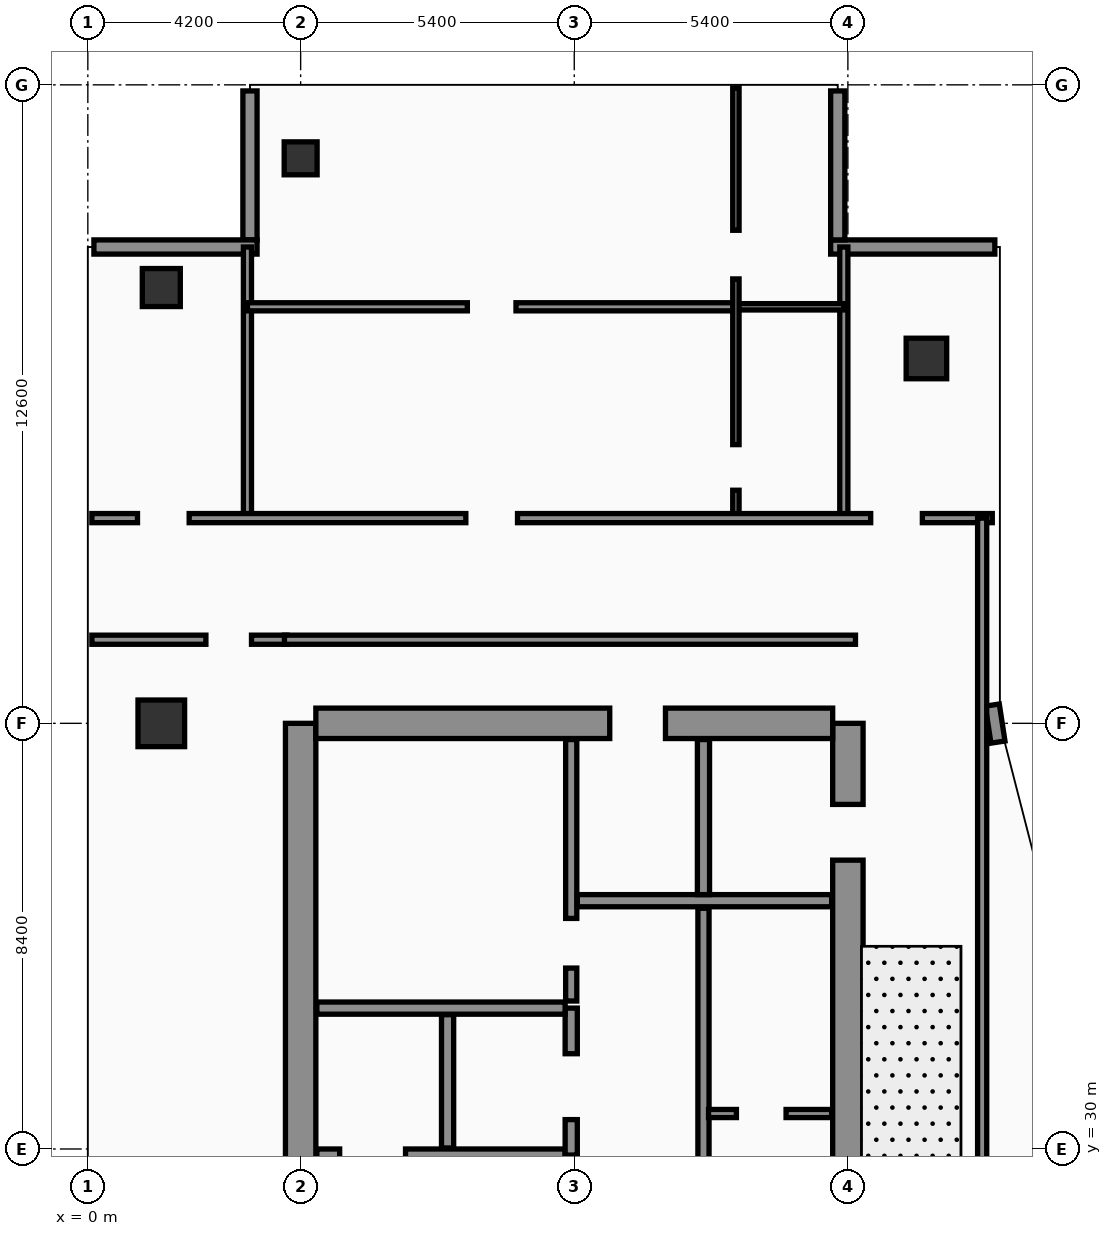
"""IFC4 building model, lengths in metres.
Left out: names, types, materials, properties, quantities, classifications, styles, units other than length and angle.
Written with IfcOpenShell. Run it as: python <this file> out.ifc"""

import sys

from ifc_helpers import new_model, si_unit, direction, frame, frame_2d, origin, origin_2d, place, context, subcontext, project, spatial, rectangle, hollow_rectangle, extrude, element, fill, save


model = new_model("IFC4")
c1 = context("Model", 3, precision=1e-05, world=origin(), true_north=direction((0.0, 1.0)))
c2 = subcontext(c1, "Body", "Model", "MODEL_VIEW")
j1 = project(units=[si_unit("LENGTHUNIT", "METRE"), si_unit("PLANEANGLEUNIT", "RADIAN")], contexts=[c1])
p1 = place(None, origin())
s1 = spatial("IfcSite", under=j1, at=p1, CompositionType="ELEMENT")
p2 = place(p1, origin())
s2 = spatial("IfcBuilding", under=s1, at=p2, CompositionType="ELEMENT")
p3 = place(p2, frame((0.0, 0.0, 291.1)))
s3 = spatial("IfcBuildingStorey", under=s2, at=p3, CompositionType="ELEMENT", Elevation=291.1)
p4 = place(p3, frame((4.2, 16.8, 0.0), z_axis=(0.0, 0.0, 1.0), x_axis=(0.0, 1.0, 0.0)))
e1 = element("IfcWall", 1, at=p4, inside=s3, PredefinedType="SHEAR", context=c2, shape_type="SweptSolid", body=[
    extrude(rectangle(XDim=21.6, YDim=0.6, at=frame_2d((10.8, 0.0))), origin(), (0.0, 0.0, 1.0), 3.56),
])
p5 = place(p3, frame((15.0, 16.8, 0.0), z_axis=(0.0, 0.0, 1.0), x_axis=(0.0, 1.0, 0.0)))
e2 = element("IfcWall", 2, at=p5, inside=s3, PredefinedType="SHEAR", context=c2, shape_type="SweptSolid", body=[
    extrude(rectangle(XDim=21.6, YDim=0.6, at=frame_2d((10.8, 0.0))), origin(), (0.0, 0.0, 1.0), 3.56),
])
p6 = place(p5, frame((8.65, 0.0, 0.0)))
e3 = element("IfcOpeningElement", 3, at=p6, cuts=e2, PredefinedType="OPENING", context=c2, shape_type="SweptSolid", body=[
    extrude(rectangle(XDim=1.1, YDim=2.2, at=frame_2d((0.55, 1.1))), frame((0.0, 0.31, 0.0), z_axis=(0.0, -1.0, 0.0), x_axis=(1.0, 0.0, 0.0)), (0.0, 0.0, 1.0), 0.62),
])
p7 = place(p5, frame((18.9, 0.0, 0.0)))
e4 = element("IfcOpeningElement", 4, at=p7, cuts=e2, PredefinedType="OPENING", context=c2, shape_type="SweptSolid", body=[
    extrude(rectangle(XDim=1.1, YDim=2.2, at=frame_2d((0.55, 1.1))), frame((0.0, 0.31, 0.0), z_axis=(0.0, -1.0, 0.0), x_axis=(1.0, 0.0, 0.0)), (0.0, 0.0, 1.0), 0.62),
])
p8 = place(p3, frame((4.5, 38.4, 0.0), z_axis=(0.0, 0.0, 1.0), x_axis=(1.0, 0.0, 0.0)))
e5 = element("IfcWall", 5, at=p8, inside=s3, PredefinedType="SHEAR", context=c2, shape_type="SweptSolid", body=[
    extrude(rectangle(XDim=10.2, YDim=0.6, at=frame_2d((5.1, 0.0))), origin(), (0.0, 0.0, 1.0), 3.56),
])
p9 = place(p8, frame((5.8, 0.0, 0.0)))
e6 = element("IfcOpeningElement", 6, at=p9, cuts=e5, PredefinedType="OPENING", context=c2, shape_type="SweptSolid", body=[
    extrude(rectangle(XDim=1.1, YDim=2.2, at=frame_2d((0.55, 1.1))), frame((0.0, 0.31, 0.0), z_axis=(0.0, -1.0, 0.0), x_axis=(1.0, 0.0, 0.0)), (0.0, 0.0, 1.0), 0.62),
])
p10 = place(p3, frame((1.45, 38.4, 0.0), z_axis=(0.0, 0.0, 1.0), x_axis=(1.0, 0.0, 0.0)))
e7 = element("IfcColumn", 7, at=p10, inside=s3, PredefinedType="COLUMN", context=c2, shape_type="SweptSolid", body=[
    extrude(rectangle(XDim=0.92, YDim=0.92, at=origin_2d()), origin(), (0.0, 0.0, 1.0), 3.56),
])
p11 = place(p3, frame((1.45, 47.0, 0.0), z_axis=(0.0, 0.0, 1.0), x_axis=(1.0, 0.0, 0.0)))
e8 = element("IfcColumn", 8, at=p11, inside=s3, PredefinedType="COLUMN", context=c2, shape_type="SweptSolid", body=[
    extrude(hollow_rectangle(XDim=0.75, YDim=0.75, WallThickness=0.032, at=origin_2d()), origin(), (0.0, 0.0, 1.0), 3.56),
])
p12 = place(p3, frame((4.2, 49.55, 0.0), z_axis=(0.0, 0.0, 1.0), x_axis=(1.0, 0.0, 0.0)))
e9 = element("IfcColumn", 9, at=p12, inside=s3, PredefinedType="COLUMN", context=c2, shape_type="SweptSolid", body=[
    extrude(hollow_rectangle(XDim=0.65, YDim=0.65, WallThickness=0.028, at=origin_2d()), origin(), (0.0, 0.0, 1.0), 3.56),
])
p13 = place(p3, frame((16.55, 45.6, 0.0), z_axis=(0.0, 0.0, 1.0), x_axis=(1.0, 0.0, 0.0)))
e10 = element("IfcColumn", 10, at=p13, inside=s3, PredefinedType="COLUMN", context=c2, shape_type="SweptSolid", body=[
    extrude(rectangle(XDim=0.8, YDim=0.8, at=origin_2d()), origin(), (0.0, 0.0, 1.0), 3.56),
])
p14 = place(p3, frame((17.962, 38.03, 0.0), z_axis=(0.0, 0.0, 1.0), x_axis=(-0.15141125477, 0.988470855377, 0.0)))
e11 = element("IfcWall", 11, at=p14, inside=s3, PredefinedType="SOLIDWALL", context=c2, shape_type="SweptSolid", body=[
    extrude(rectangle(XDim=0.739, YDim=0.28, at=frame_2d((0.369, 0.0))), origin(), (0.0, 0.0, 1.0), 3.56),
])
p15 = place(p3, frame((17.9, 47.8, 0.0), z_axis=(0.0, 0.0, 1.0), x_axis=(-1.0, 0.0, 0.0)))
e12 = element("IfcWall", 12, at=p15, inside=s3, PredefinedType="SOLIDWALL", context=c2, shape_type="SweptSolid", body=[
    extrude(rectangle(XDim=3.24, YDim=0.28, at=frame_2d((1.62, 0.0))), origin(), (0.0, 0.0, 1.0), 3.56),
])
p16 = place(p3, frame((14.8, 47.94, 0.0), z_axis=(0.0, 0.0, 1.0), x_axis=(0.0, 1.0, 0.0)))
e13 = element("IfcWall", 13, at=p16, inside=s3, PredefinedType="SOLIDWALL", context=c2, shape_type="SweptSolid", body=[
    extrude(rectangle(XDim=2.94, YDim=0.28, at=frame_2d((1.47, 0.0))), origin(), (0.0, 0.0, 1.0), 3.56),
])
p17 = place(p3, frame((3.2, 50.88, 0.0), z_axis=(0.0, 0.0, 1.0), x_axis=(0.0, -1.0, 0.0)))
e14 = element("IfcWall", 14, at=p17, inside=s3, PredefinedType="SOLIDWALL", context=c2, shape_type="SweptSolid", body=[
    extrude(rectangle(XDim=2.94, YDim=0.28, at=frame_2d((1.47, 0.0))), origin(), (0.0, 0.0, 1.0), 3.09),
])
p18 = place(p3, frame((3.34, 47.8, 0.0), z_axis=(0.0, 0.0, 1.0), x_axis=(-1.0, 0.0, 0.0)))
e15 = element("IfcWall", 15, at=p18, inside=s3, PredefinedType="SOLIDWALL", context=c2, shape_type="SweptSolid", body=[
    extrude(rectangle(XDim=3.22, YDim=0.28, at=frame_2d((1.61, 0.0))), origin(), (0.0, 0.0, 1.0), 3.09),
])
p19 = place(p3, frame((4.52, 29.88, 0.0), z_axis=(0.0, 0.0, 1.0), x_axis=(1.0, 0.0, 0.0)))
e16 = element("IfcWall", 16, at=p19, inside=s3, PredefinedType="SOLIDWALL", context=c2, shape_type="SweptSolid", body=[
    extrude(rectangle(XDim=4.9, YDim=0.24, at=frame_2d((2.45, 0.0))), origin(), (0.0, 0.0, 1.0), 3.56),
])
p20 = place(p19, frame((0.45, 0.0, 0.0)))
e17 = element("IfcOpeningElement", 17, at=p20, cuts=e16, PredefinedType="OPENING", context=c2, shape_type="SweptSolid", body=[
    extrude(rectangle(XDim=1.3, YDim=2.35, at=frame_2d((0.65, 1.175))), frame((0.0, 0.13, 0.0), z_axis=(0.0, -1.0, 0.0), x_axis=(1.0, 0.0, 0.0)), (0.0, 0.0, 1.0), 0.26),
])
p21 = place(p3, frame((7.1, 30.02, 0.0), z_axis=(0.0, 0.0, 1.0), x_axis=(0.0, 1.0, 0.0)))
e18 = element("IfcWall", 18, at=p21, inside=s3, PredefinedType="SOLIDWALL", context=c2, shape_type="SweptSolid", body=[
    extrude(rectangle(XDim=2.63, YDim=0.24, at=frame_2d((1.315, 0.0))), origin(), (0.0, 0.0, 1.0), 3.56),
])
p22 = place(p3, frame((9.54, 29.88, 0.0), z_axis=(0.0, 0.0, 1.0), x_axis=(0.0, 1.0, 0.0)))
e19 = element("IfcWall", 19, at=p22, inside=s3, PredefinedType="SOLIDWALL", context=c2, shape_type="SweptSolid", body=[
    extrude(rectangle(XDim=2.9, YDim=0.24, at=frame_2d((1.45, 0.0))), origin(), (0.0, 0.0, 1.0), 3.56),
])
p23 = place(p22, frame((0.7, 0.0, 0.0)))
e20 = element("IfcOpeningElement", 20, at=p23, cuts=e19, PredefinedType="OPENING", context=c2, shape_type="SweptSolid", body=[
    extrude(rectangle(XDim=1.3, YDim=2.35, at=frame_2d((0.65, 1.175))), frame((0.0, 0.13, 0.0), z_axis=(0.0, -1.0, 0.0), x_axis=(1.0, 0.0, 0.0)), (0.0, 0.0, 1.0), 0.26),
])
p24 = place(p3, frame((4.52, 32.78, 0.0), z_axis=(0.0, 0.0, 1.0), x_axis=(1.0, 0.0, 0.0)))
e21 = element("IfcWall", 21, at=p24, inside=s3, PredefinedType="SOLIDWALL", context=c2, shape_type="SweptSolid", body=[
    extrude(rectangle(XDim=4.9, YDim=0.24, at=frame_2d((2.45, 0.0))), origin(), (0.0, 0.0, 1.0), 3.19),
])
p25 = place(p3, frame((9.54, 32.92, 0.0), z_axis=(0.0, 0.0, 1.0), x_axis=(0.0, 1.0, 0.0)))
e22 = element("IfcWall", 22, at=p25, inside=s3, PredefinedType="SOLIDWALL", context=c2, shape_type="SweptSolid", body=[
    extrude(rectangle(XDim=5.16, YDim=0.22, at=frame_2d((2.58, 0.0))), origin(), (0.0, 0.0, 1.0), 3.56),
])
p26 = place(p25, frame((0.65, 0.0, 0.0)))
e23 = element("IfcOpeningElement", 23, at=p26, cuts=e22, PredefinedType="OPENING", context=c2, shape_type="SweptSolid", body=[
    extrude(rectangle(XDim=0.98, YDim=2.15, at=frame_2d((0.49, 1.075))), frame((0.0, 0.12, 0.0), z_axis=(0.0, -1.0, 0.0), x_axis=(1.0, 0.0, 0.0)), (0.0, 0.0, 1.0), 0.24),
])
p27 = place(p3, frame((12.15, 27.0, 0.0), z_axis=(0.0, 0.0, 1.0), x_axis=(0.0, 1.0, 0.0)))
e24 = element("IfcWall", 24, at=p27, inside=s3, PredefinedType="SOLIDWALL", context=c2, shape_type="SweptSolid", body=[
    extrude(rectangle(XDim=7.75, YDim=0.22, at=frame_2d((3.875, 0.0))), origin(), (0.0, 0.0, 1.0), 3.56),
])
p28 = place(p27, frame((0.8, 0.0, 0.0)))
e25 = element("IfcOpeningElement", 25, at=p28, cuts=e24, PredefinedType="OPENING", context=c2, shape_type="SweptSolid", body=[
    extrude(rectangle(XDim=0.98, YDim=2.15, at=frame_2d((0.49, 1.075))), frame((0.0, 0.12, 0.0), z_axis=(0.0, -1.0, 0.0), x_axis=(1.0, 0.0, 0.0)), (0.0, 0.0, 1.0), 0.24),
])
p29 = place(p3, frame((12.25, 30.7, 0.0), z_axis=(0.0, 0.0, 1.0), x_axis=(1.0, 0.0, 0.0)))
e26 = element("IfcWall", 26, at=p29, inside=s3, PredefinedType="PARTITIONING", context=c2, shape_type="SweptSolid", body=[
    extrude(rectangle(XDim=2.43, YDim=0.16, at=frame_2d((1.215, 0.0))), origin(), (0.0, 0.0, 1.0), 3.56),
])
p30 = place(p29, frame((0.55, 0.0, 0.0)))
e27 = element("IfcOpeningElement", 27, at=p30, cuts=e26, PredefinedType="OPENING", context=c2, shape_type="SweptSolid", body=[
    extrude(rectangle(XDim=0.98, YDim=2.15, at=frame_2d((0.49, 1.075))), frame((0.0, 0.09, 0.0), z_axis=(0.0, -1.0, 0.0), x_axis=(1.0, 0.0, 0.0)), (0.0, 0.0, 1.0), 0.18),
])
p31 = place(p3, frame((9.66, 34.9, 0.0), z_axis=(0.0, 0.0, 1.0), x_axis=(1.0, 0.0, 0.0)))
e28 = element("IfcWall", 28, at=p31, inside=s3, PredefinedType="SOLIDWALL", context=c2, shape_type="SweptSolid", body=[
    extrude(rectangle(XDim=5.02, YDim=0.24, at=frame_2d((2.51, 0.0))), origin(), (0.0, 0.0, 1.0), 3.56),
])
p32 = place(p3, frame((12.15, 35.02, 0.0), z_axis=(0.0, 0.0, 1.0), x_axis=(0.0, 1.0, 0.0)))
e29 = element("IfcWall", 29, at=p32, inside=s3, PredefinedType="SOLIDWALL", context=c2, shape_type="SweptSolid", body=[
    extrude(rectangle(XDim=3.06, YDim=0.24, at=frame_2d((1.53, 0.0))), origin(), (0.0, 0.0, 1.0), 3.56),
])
p33 = place(p3, frame((0.08, 40.05, 0.0), z_axis=(0.0, 0.0, 1.0), x_axis=(1.0, 0.0, 0.0)))
e30 = element("IfcWall", 30, at=p33, inside=s3, PredefinedType="PARTITIONING", context=c2, shape_type="SweptSolid", body=[
    extrude(rectangle(XDim=3.85, YDim=0.18, at=frame_2d((1.925, 0.0))), origin(), (0.0, 0.0, 1.0), 2.99),
])
p34 = place(p33, frame((2.25, 0.0, 0.0)))
e31 = element("IfcOpeningElement", 31, at=p34, cuts=e30, PredefinedType="OPENING", context=c2, shape_type="SweptSolid", body=[
    extrude(rectangle(XDim=0.9, YDim=2.15, at=frame_2d((0.45, 1.075))), frame((0.0, 0.1, 0.0), z_axis=(0.0, -1.0, 0.0), x_axis=(1.0, 0.0, 0.0)), (0.0, 0.0, 1.0), 0.2),
])
p35 = place(p3, frame((3.15, 42.45, 0.0), z_axis=(0.0, 0.0, 1.0), x_axis=(0.0, 1.0, 0.0)))
e32 = element("IfcWall", 32, at=p35, inside=s3, PredefinedType="PARTITIONING", context=c2, shape_type="SweptSolid", body=[
    extrude(rectangle(XDim=5.35, YDim=0.16, at=frame_2d((2.675, 0.0))), origin(), (0.0, 0.0, 1.0), 3.14),
])
p36 = place(p3, frame((14.92, 42.45, 0.0), z_axis=(0.0, 0.0, 1.0), x_axis=(0.0, 1.0, 0.0)))
e33 = element("IfcWall", 33, at=p36, inside=s3, PredefinedType="PARTITIONING", context=c2, shape_type="SweptSolid", body=[
    extrude(rectangle(XDim=5.35, YDim=0.16, at=frame_2d((2.675, 0.0))), origin(), (0.0, 0.0, 1.0), 3.09),
])
p37 = place(p3, frame((12.79, 46.62, 0.0), z_axis=(0.0, 0.0, 1.0), x_axis=(1.0, 0.0, 0.0)))
e34 = element("IfcWall", 34, at=p37, inside=s3, PredefinedType="PARTITIONING", context=c2, shape_type="SweptSolid", body=[
    extrude(rectangle(XDim=2.13, YDim=0.125, at=frame_2d((1.065, 0.0))), origin(), (0.0, 0.0, 1.0), 3.09),
])
p38 = place(p3, frame((3.15, 46.62, 0.0), z_axis=(0.0, 0.0, 1.0), x_axis=(1.0, 0.0, 0.0)))
e35 = element("IfcWall", 35, at=p38, inside=s3, PredefinedType="PARTITIONING", context=c2, shape_type="SweptSolid", body=[
    extrude(rectangle(XDim=9.64, YDim=0.16, at=frame_2d((4.82, 0.0))), origin(), (0.0, 0.0, 1.0), 2.99),
])
p39 = place(p38, frame((4.34, 0.0, 0.0)))
e36 = element("IfcOpeningElement", 36, at=p39, cuts=e35, PredefinedType="OPENING", context=c2, shape_type="SweptSolid", body=[
    extrude(rectangle(XDim=0.96, YDim=2.2, at=frame_2d((0.48, 1.1))), frame((0.0, 0.09, 0.0), z_axis=(0.0, -1.0, 0.0), x_axis=(1.0, 0.0, 0.0)), (0.0, 0.0, 1.0), 0.18),
])
p40 = place(p3, frame((12.79, 42.45, 0.0), z_axis=(0.0, 0.0, 1.0), x_axis=(0.0, 1.0, 0.0)))
e37 = element("IfcWall", 37, at=p40, inside=s3, PredefinedType="PARTITIONING", context=c2, shape_type="SweptSolid", body=[
    extrude(rectangle(XDim=8.49, YDim=0.125, at=frame_2d((4.245, 0.0))), origin(), (0.0, 0.0, 1.0), 3.09),
])
p41 = place(p40, frame((0.55, 0.0, 0.0)))
e38 = element("IfcOpeningElement", 38, at=p41, cuts=e37, PredefinedType="OPENING", context=c2, shape_type="SweptSolid", body=[
    extrude(rectangle(XDim=0.9, YDim=2.15, at=frame_2d((0.45, 1.075))), frame((0.0, 0.073, 0.0), z_axis=(0.0, -1.0, 0.0), x_axis=(1.0, 0.0, 0.0)), (0.0, 0.0, 1.0), 0.145),
])
p42 = place(p40, frame((4.72, 0.0, 0.0)))
e39 = element("IfcOpeningElement", 39, at=p42, cuts=e37, PredefinedType="OPENING", context=c2, shape_type="SweptSolid", body=[
    extrude(rectangle(XDim=0.96, YDim=2.2, at=frame_2d((0.48, 1.1))), frame((0.0, 0.073, 0.0), z_axis=(0.0, -1.0, 0.0), x_axis=(1.0, 0.0, 0.0)), (0.0, 0.0, 1.0), 0.145),
])
p43 = place(p3, frame((0.08, 42.45, 0.0), z_axis=(0.0, 0.0, 1.0), x_axis=(1.0, 0.0, 0.0)))
e40 = element("IfcWall", 40, at=p43, inside=s3, PredefinedType="PARTITIONING", context=c2, shape_type="SweptSolid", body=[
    extrude(rectangle(XDim=17.77, YDim=0.18, at=frame_2d((8.885, 0.0))), origin(), (0.0, 0.0, 1.0), 2.99),
])
p44 = place(p43, frame((0.9, 0.0, 0.0)))
e41 = element("IfcOpeningElement", 41, at=p44, cuts=e40, PredefinedType="OPENING", context=c2, shape_type="SweptSolid", body=[
    extrude(rectangle(XDim=1.02, YDim=2.2, at=frame_2d((0.51, 1.1))), frame((0.0, 0.1, 0.0), z_axis=(0.0, -1.0, 0.0), x_axis=(1.0, 0.0, 0.0)), (0.0, 0.0, 1.0), 0.2),
])
p45 = place(p43, frame((7.38, 0.0, 0.0)))
e42 = element("IfcOpeningElement", 42, at=p45, cuts=e40, PredefinedType="OPENING", context=c2, shape_type="SweptSolid", body=[
    extrude(rectangle(XDim=1.02, YDim=2.2, at=frame_2d((0.51, 1.1))), frame((0.0, 0.1, 0.0), z_axis=(0.0, -1.0, 0.0), x_axis=(1.0, 0.0, 0.0)), (0.0, 0.0, 1.0), 0.2),
])
p46 = place(p43, frame((15.37, 0.0, 0.0)))
e43 = element("IfcOpeningElement", 43, at=p46, cuts=e40, PredefinedType="OPENING", context=c2, shape_type="SweptSolid", body=[
    extrude(rectangle(XDim=1.02, YDim=2.2, at=frame_2d((0.51, 1.1))), frame((0.0, 0.1, 0.0), z_axis=(0.0, -1.0, 0.0), x_axis=(1.0, 0.0, 0.0)), (0.0, 0.0, 1.0), 0.2),
])
p47 = place(p3, frame((17.65, 24.3, 0.0), z_axis=(0.0, 0.0, 1.0), x_axis=(0.0, 1.0, 0.0)))
e44 = element("IfcWall", 44, at=p47, inside=s3, PredefinedType="PARTITIONING", context=c2, shape_type="SweptSolid", body=[
    extrude(rectangle(XDim=18.15, YDim=0.18, at=frame_2d((9.075, 0.0))), origin(), (0.0, 0.0, 1.0), 2.99),
])
p48 = place(p47, frame((3.2, 0.0, 0.0)))
e45 = element("IfcOpeningElement", 45, at=p48, cuts=e44, PredefinedType="OPENING", context=c2, shape_type="SweptSolid", body=[
    extrude(rectangle(XDim=1.02, YDim=2.2, at=frame_2d((0.51, 1.1))), frame((0.0, 0.1, 0.0), z_axis=(0.0, -1.0, 0.0), x_axis=(1.0, 0.0, 0.0)), (0.0, 0.0, 1.0), 0.2),
])
p49 = place(p3, frame((3.88, 40.05, 0.0), z_axis=(0.0, 0.0, 1.0), x_axis=(1.0, 0.0, 0.0)))
e46 = element("IfcWall", 46, at=p49, inside=s3, PredefinedType="PARTITIONING", context=c2, shape_type="SweptSolid", body=[
    extrude(rectangle(XDim=11.27, YDim=0.18, at=frame_2d((5.635, 0.0))), origin(), (0.0, 0.0, 1.0), 2.99),
])
p50 = place(p20, origin())
e47 = element("IfcDoor", 47, at=p50, inside=s3, OperationType="DOUBLE_DOOR_SLIDING", PredefinedType="DOOR", context=c2, shape_type="SweptSolid", body=[
    extrude(rectangle(XDim=1.3, YDim=2.35, at=frame_2d((0.65, 1.175))), frame((0.0, 0.025, 0.0), z_axis=(0.0, -1.0, 0.0), x_axis=(1.0, 0.0, 0.0)), (0.0, 0.0, 1.0), 0.05),
])
fill(e17, e47)
p51 = place(p23, origin())
e48 = element("IfcDoor", 48, at=p51, inside=s3, OperationType="DOUBLE_DOOR_SLIDING", PredefinedType="DOOR", context=c2, shape_type="SweptSolid", body=[
    extrude(rectangle(XDim=1.3, YDim=2.35, at=frame_2d((0.65, 1.175))), frame((0.0, 0.025, 0.0), z_axis=(0.0, -1.0, 0.0), x_axis=(1.0, 0.0, 0.0)), (0.0, 0.0, 1.0), 0.05),
])
fill(e20, e48)
p52 = place(p26, origin())
e49 = element("IfcDoor", 49, at=p52, inside=s3, OperationType="SINGLE_SWING_LEFT", PredefinedType="DOOR", context=c2, shape_type="SweptSolid", body=[
    extrude(rectangle(XDim=0.98, YDim=2.15, at=frame_2d((0.49, 1.075))), frame((0.0, 0.025, 0.0), z_axis=(0.0, -1.0, 0.0), x_axis=(1.0, 0.0, 0.0)), (0.0, 0.0, 1.0), 0.05),
])
fill(e23, e49)
p53 = place(p30, origin())
e50 = element("IfcDoor", 50, at=p53, inside=s3, OperationType="SINGLE_SWING_LEFT", PredefinedType="DOOR", context=c2, shape_type="SweptSolid", body=[
    extrude(rectangle(XDim=0.98, YDim=2.15, at=frame_2d((0.49, 1.075))), frame((0.0, 0.025, 0.0), z_axis=(0.0, -1.0, 0.0), x_axis=(1.0, 0.0, 0.0)), (0.0, 0.0, 1.0), 0.05),
])
fill(e27, e50)
p54 = place(p34, origin())
e51 = element("IfcDoor", 51, at=p54, inside=s3, OperationType="SINGLE_SWING_LEFT", PredefinedType="DOOR", context=c2, shape_type="SweptSolid", body=[
    extrude(rectangle(XDim=0.9, YDim=2.15, at=frame_2d((0.45, 1.075))), frame((0.0, 0.025, 0.0), z_axis=(0.0, -1.0, 0.0), x_axis=(1.0, 0.0, 0.0)), (0.0, 0.0, 1.0), 0.05),
])
fill(e31, e51)
p55 = place(p39, origin())
e52 = element("IfcDoor", 52, at=p55, inside=s3, OperationType="SINGLE_SWING_LEFT", PredefinedType="DOOR", context=c2, shape_type="SweptSolid", body=[
    extrude(rectangle(XDim=0.96, YDim=2.2, at=frame_2d((0.48, 1.1))), frame((0.0, 0.025, 0.0), z_axis=(0.0, -1.0, 0.0), x_axis=(1.0, 0.0, 0.0)), (0.0, 0.0, 1.0), 0.05),
])
fill(e36, e52)
p56 = place(p41, origin())
e53 = element("IfcDoor", 53, at=p56, inside=s3, OperationType="SINGLE_SWING_LEFT", PredefinedType="DOOR", context=c2, shape_type="SweptSolid", body=[
    extrude(rectangle(XDim=0.9, YDim=2.15, at=frame_2d((0.45, 1.075))), frame((0.0, 0.025, 0.0), z_axis=(0.0, -1.0, 0.0), x_axis=(1.0, 0.0, 0.0)), (0.0, 0.0, 1.0), 0.05),
])
fill(e38, e53)
p57 = place(p42, origin())
e54 = element("IfcDoor", 54, at=p57, inside=s3, OperationType="SINGLE_SWING_RIGHT", PredefinedType="DOOR", context=c2, shape_type="SweptSolid", body=[
    extrude(rectangle(XDim=0.96, YDim=2.2, at=frame_2d((0.48, 1.1))), frame((0.0, 0.025, 0.0), z_axis=(0.0, -1.0, 0.0), x_axis=(1.0, 0.0, 0.0)), (0.0, 0.0, 1.0), 0.05),
])
fill(e39, e54)
p58 = place(p44, origin())
e55 = element("IfcDoor", 55, at=p58, inside=s3, OperationType="SINGLE_SWING_LEFT", PredefinedType="DOOR", context=c2, shape_type="SweptSolid", body=[
    extrude(rectangle(XDim=1.02, YDim=2.2, at=frame_2d((0.51, 1.1))), frame((0.0, 0.025, 0.0), z_axis=(0.0, -1.0, 0.0), x_axis=(1.0, 0.0, 0.0)), (0.0, 0.0, 1.0), 0.05),
])
fill(e41, e55)
p59 = place(p45, origin())
e56 = element("IfcDoor", 56, at=p59, inside=s3, OperationType="SINGLE_SWING_RIGHT", PredefinedType="DOOR", context=c2, shape_type="SweptSolid", body=[
    extrude(rectangle(XDim=1.02, YDim=2.2, at=frame_2d((0.51, 1.1))), frame((0.0, 0.025, 0.0), z_axis=(0.0, -1.0, 0.0), x_axis=(1.0, 0.0, 0.0)), (0.0, 0.0, 1.0), 0.05),
])
fill(e42, e56)
p60 = place(p46, origin())
e57 = element("IfcDoor", 57, at=p60, inside=s3, OperationType="SINGLE_SWING_RIGHT", PredefinedType="DOOR", context=c2, shape_type="SweptSolid", body=[
    extrude(rectangle(XDim=1.02, YDim=2.2, at=frame_2d((0.51, 1.1))), frame((0.0, 0.025, 0.0), z_axis=(0.0, -1.0, 0.0), x_axis=(1.0, 0.0, 0.0)), (0.0, 0.0, 1.0), 0.05),
])
fill(e43, e57)
p61 = place(p7, origin())
e58 = element("IfcDoor", 58, at=p61, inside=s3, OperationType="DOUBLE_DOOR_SLIDING", PredefinedType="DOOR", context=c2, shape_type="SweptSolid", body=[
    extrude(rectangle(XDim=1.1, YDim=2.2, at=frame_2d((0.55, 1.1))), frame((0.0, 0.025, 0.0), z_axis=(0.0, -1.0, 0.0), x_axis=(1.0, 0.0, 0.0)), (0.0, 0.0, 1.0), 0.05),
])
fill(e4, e58)
p62 = place(p9, origin())
e59 = element("IfcDoor", 59, at=p62, inside=s3, OperationType="DOUBLE_DOOR_SLIDING", PredefinedType="DOOR", context=c2, shape_type="SweptSolid", body=[
    extrude(rectangle(XDim=1.1, YDim=2.2, at=frame_2d((0.55, 1.1))), frame((0.0, 0.025, 0.0), z_axis=(0.0, -1.0, 0.0), x_axis=(1.0, 0.0, 0.0)), (0.0, 0.0, 1.0), 0.05),
])
fill(e6, e59)
save(model, sys.argv[1])
